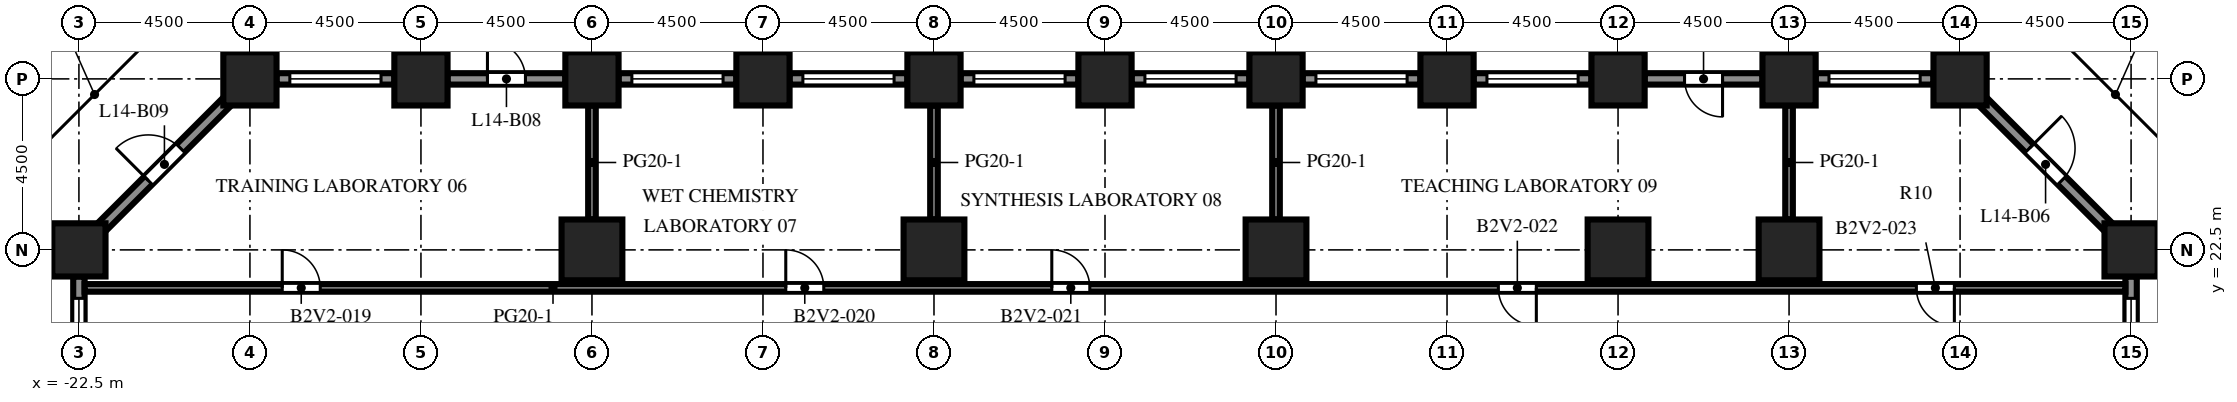
"""IFC4 building model, lengths in metres.
Left out: names, types, materials, properties, quantities, classifications, styles, units other than length and angle.
Written with IfcOpenShell. Run it as: python <this file> out.ifc"""

import sys

from ifc_helpers import new_model, si_unit, direction, frame, frame_2d, origin, origin_2d, place, context, subcontext, project, spatial, rectangle, extrude, element, fill, save


model = new_model("IFC4")
c1 = context("Model", 3, precision=1e-05, world=origin(), true_north=direction((0.0, 1.0)))
c2 = subcontext(c1, "Body", "Model", "MODEL_VIEW")
j1 = project(units=[si_unit("LENGTHUNIT", "METRE"), si_unit("PLANEANGLEUNIT", "RADIAN")], contexts=[c1])
p1 = place(None, origin())
s1 = spatial("IfcSite", under=j1, at=p1, CompositionType="ELEMENT")
p2 = place(p1, origin())
s2 = spatial("IfcBuilding", under=s1, at=p2, CompositionType="ELEMENT")
p3 = place(p2, frame((0.0, 0.0, 62.4)))
s3 = spatial("IfcBuildingStorey", under=s2, at=p3, CompositionType="ELEMENT", Elevation=62.4)
for number, where, z_axis, x_axis in (
    (1, (-22.5, 22.5, 0.0), (0.0, 0.0, 1.0), (1.0, 0.0, 0.0)),
    (2, (-18.0, 27.0, 0.0), (0.0, 0.0, 1.0), (1.0, 0.0, 0.0)),
    (3, (-13.5, 27.0, 0.0), (0.0, 0.0, 1.0), (1.0, 0.0, 0.0)),
    (4, (-9.0, 27.0, 0.0), (0.0, 0.0, 1.0), (1.0, 0.0, 0.0)),
    (5, (-4.5, 27.0, 0.0), (0.0, 0.0, 1.0), (1.0, 0.0, 0.0)),
    (6, (0.0, 27.0, 0.0), (0.0, 0.0, 1.0), (1.0, 0.0, 0.0)),
    (7, (4.5, 27.0, 0.0), (0.0, 0.0, 1.0), (1.0, 0.0, 0.0)),
    (8, (9.0, 27.0, 0.0), (0.0, 0.0, 1.0), (1.0, 0.0, 0.0)),
    (9, (13.5, 27.0, 0.0), (0.0, 0.0, 1.0), (1.0, 0.0, 0.0)),
    (10, (18.0, 27.0, 0.0), (0.0, 0.0, 1.0), (1.0, 0.0, 0.0)),
    (11, (22.5, 27.0, 0.0), (0.0, 0.0, 1.0), (1.0, 0.0, 0.0)),
    (12, (27.0, 27.0, 0.0), (0.0, 0.0, 1.0), (1.0, 0.0, 0.0)),
    (13, (31.5, 22.5, 0.0), (0.0, 0.0, 1.0), (1.0, 0.0, 0.0)),
):
    element("IfcColumn", number, at=place(p3, frame(where, z_axis=z_axis, x_axis=x_axis)), inside=s3, PredefinedType="COLUMN", context=c2, shape_type="SweptSolid", body=[
        extrude(rectangle(XDim=1.4, YDim=1.4, at=origin_2d()), origin(), (0.0, 0.0, 1.0), 4.1),
    ])
for number, where, z_axis, x_axis in (
    (14, (-9.0, 22.5, 0.0), (0.0, 0.0, 1.0), (1.0, 0.0, 0.0)),
    (15, (0.0, 22.5, 0.0), (0.0, 0.0, 1.0), (1.0, 0.0, 0.0)),
    (16, (9.0, 22.5, 0.0), (0.0, 0.0, 1.0), (1.0, 0.0, 0.0)),
    (17, (18.0, 22.5, 0.0), (0.0, 0.0, 1.0), (1.0, 0.0, 0.0)),
    (18, (22.5, 22.5, 0.0), (0.0, 0.0, 1.0), (1.0, 0.0, 0.0)),
):
    element("IfcColumn", number, at=place(p3, frame(where, z_axis=z_axis, x_axis=x_axis)), inside=s3, PredefinedType="COLUMN", context=c2, shape_type="SweptSolid", body=[
        extrude(rectangle(XDim=1.6, YDim=1.6, at=origin_2d()), origin(), (0.0, 0.0, 1.0), 4.1),
    ])
p4 = place(p3, frame((31.5, 21.8, 0.0), z_axis=(0.0, 0.0, 1.0), x_axis=(0.0, -1.0, 0.0)))
e19 = element("IfcWall", 19, at=p4, inside=s3, PredefinedType="SOLIDWALL", context=c2, shape_type="SweptSolid", body=[
    extrude(rectangle(XDim=3.1, YDim=0.3, at=frame_2d((1.55, 0.0))), origin(), (0.0, 0.0, 1.0), 2.75),
])
p5 = place(p4, frame((0.575, 0.0, 0.8)))
e20 = element("IfcOpeningElement", 20, at=p5, cuts=e19, PredefinedType="OPENING", context=c2, shape_type="SweptSolid", body=[
    extrude(rectangle(XDim=2.4, YDim=1.7, at=frame_2d((1.2, 0.85))), frame((0.0, 0.16, 0.0), z_axis=(0.0, -1.0, 0.0), x_axis=(1.0, 0.0, 0.0)), (0.0, 0.0, 1.0), 0.32),
])
p6 = place(p3, frame((27.594, 26.406, 0.0), z_axis=(0.0, 0.0, 1.0), x_axis=(0.707106781187, -0.707106781187, 0.0)))
e21 = element("IfcWall", 21, at=p6, inside=s3, PredefinedType="SOLIDWALL", context=c2, shape_type="SweptSolid", body=[
    extrude(rectangle(XDim=4.684, YDim=0.3, at=frame_2d((2.342, 0.0))), origin(), (0.0, 0.0, 1.0), 2.75),
])
p7 = place(p6, frame((1.742, 0.0, 0.0)))
e22 = element("IfcOpeningElement", 22, at=p7, cuts=e21, PredefinedType="OPENING", context=c2, shape_type="SweptSolid", body=[
    extrude(rectangle(XDim=1.2, YDim=2.2, at=frame_2d((0.6, 1.1))), frame((0.0, 0.16, 0.0), z_axis=(0.0, -1.0, 0.0), x_axis=(1.0, 0.0, 0.0)), (0.0, 0.0, 1.0), 0.32),
])
p8 = place(p3, frame((23.2, 27.0, 0.0), z_axis=(0.0, 0.0, 1.0), x_axis=(1.0, 0.0, 0.0)))
e23 = element("IfcWall", 23, at=p8, inside=s3, PredefinedType="SOLIDWALL", context=c2, shape_type="SweptSolid", body=[
    extrude(rectangle(XDim=3.1, YDim=0.3, at=frame_2d((1.55, 0.0))), origin(), (0.0, 0.0, 1.0), 2.75),
])
p9 = place(p8, frame((0.35, 0.0, 0.8)))
e24 = element("IfcOpeningElement", 24, at=p9, cuts=e23, PredefinedType="OPENING", context=c2, shape_type="SweptSolid", body=[
    extrude(rectangle(XDim=2.4, YDim=1.7, at=frame_2d((1.2, 0.85))), frame((0.0, 0.16, 0.0), z_axis=(0.0, -1.0, 0.0), x_axis=(1.0, 0.0, 0.0)), (0.0, 0.0, 1.0), 0.32),
])
p10 = place(p3, frame((18.7, 27.0, 0.0), z_axis=(0.0, 0.0, 1.0), x_axis=(1.0, 0.0, 0.0)))
e25 = element("IfcWall", 25, at=p10, inside=s3, PredefinedType="SOLIDWALL", context=c2, shape_type="SweptSolid", body=[
    extrude(rectangle(XDim=3.1, YDim=0.3, at=frame_2d((1.55, 0.0))), origin(), (0.0, 0.0, 1.0), 2.75),
])
p11 = place(p10, frame((1.05, 0.0, 0.0)))
e26 = element("IfcOpeningElement", 26, at=p11, cuts=e25, PredefinedType="OPENING", context=c2, shape_type="SweptSolid", body=[
    extrude(rectangle(XDim=1.0, YDim=2.2, at=frame_2d((0.5, 1.1))), frame((0.0, 0.16, 0.0), z_axis=(0.0, -1.0, 0.0), x_axis=(1.0, 0.0, 0.0)), (0.0, 0.0, 1.0), 0.32),
])
p12 = place(p3, frame((14.2, 27.0, 0.0), z_axis=(0.0, 0.0, 1.0), x_axis=(1.0, 0.0, 0.0)))
e27 = element("IfcWall", 27, at=p12, inside=s3, PredefinedType="SOLIDWALL", context=c2, shape_type="SweptSolid", body=[
    extrude(rectangle(XDim=3.1, YDim=0.3, at=frame_2d((1.55, 0.0))), origin(), (0.0, 0.0, 1.0), 2.75),
])
p13 = place(p12, frame((0.35, 0.0, 0.8)))
e28 = element("IfcOpeningElement", 28, at=p13, cuts=e27, PredefinedType="OPENING", context=c2, shape_type="SweptSolid", body=[
    extrude(rectangle(XDim=2.4, YDim=1.7, at=frame_2d((1.2, 0.85))), frame((0.0, 0.16, 0.0), z_axis=(0.0, -1.0, 0.0), x_axis=(1.0, 0.0, 0.0)), (0.0, 0.0, 1.0), 0.32),
])
p14 = place(p3, frame((9.7, 27.0, 0.0), z_axis=(0.0, 0.0, 1.0), x_axis=(1.0, 0.0, 0.0)))
e29 = element("IfcWall", 29, at=p14, inside=s3, PredefinedType="SOLIDWALL", context=c2, shape_type="SweptSolid", body=[
    extrude(rectangle(XDim=3.1, YDim=0.3, at=frame_2d((1.55, 0.0))), origin(), (0.0, 0.0, 1.0), 2.75),
])
p15 = place(p14, frame((0.35, 0.0, 0.8)))
e30 = element("IfcOpeningElement", 30, at=p15, cuts=e29, PredefinedType="OPENING", context=c2, shape_type="SweptSolid", body=[
    extrude(rectangle(XDim=2.4, YDim=1.7, at=frame_2d((1.2, 0.85))), frame((0.0, 0.16, 0.0), z_axis=(0.0, -1.0, 0.0), x_axis=(1.0, 0.0, 0.0)), (0.0, 0.0, 1.0), 0.32),
])
p16 = place(p3, frame((5.2, 27.0, 0.0), z_axis=(0.0, 0.0, 1.0), x_axis=(1.0, 0.0, 0.0)))
e31 = element("IfcWall", 31, at=p16, inside=s3, PredefinedType="SOLIDWALL", context=c2, shape_type="SweptSolid", body=[
    extrude(rectangle(XDim=3.1, YDim=0.3, at=frame_2d((1.55, 0.0))), origin(), (0.0, 0.0, 1.0), 2.75),
])
p17 = place(p16, frame((0.35, 0.0, 0.8)))
e32 = element("IfcOpeningElement", 32, at=p17, cuts=e31, PredefinedType="OPENING", context=c2, shape_type="SweptSolid", body=[
    extrude(rectangle(XDim=2.4, YDim=1.7, at=frame_2d((1.2, 0.85))), frame((0.0, 0.16, 0.0), z_axis=(0.0, -1.0, 0.0), x_axis=(1.0, 0.0, 0.0)), (0.0, 0.0, 1.0), 0.32),
])
p18 = place(p3, frame((0.7, 27.0, 0.0), z_axis=(0.0, 0.0, 1.0), x_axis=(1.0, 0.0, 0.0)))
e33 = element("IfcWall", 33, at=p18, inside=s3, PredefinedType="SOLIDWALL", context=c2, shape_type="SweptSolid", body=[
    extrude(rectangle(XDim=3.1, YDim=0.3, at=frame_2d((1.55, 0.0))), origin(), (0.0, 0.0, 1.0), 2.75),
])
p19 = place(p18, frame((0.35, 0.0, 0.8)))
e34 = element("IfcOpeningElement", 34, at=p19, cuts=e33, PredefinedType="OPENING", context=c2, shape_type="SweptSolid", body=[
    extrude(rectangle(XDim=2.4, YDim=1.7, at=frame_2d((1.2, 0.85))), frame((0.0, 0.16, 0.0), z_axis=(0.0, -1.0, 0.0), x_axis=(1.0, 0.0, 0.0)), (0.0, 0.0, 1.0), 0.32),
])
p20 = place(p3, frame((-3.8, 27.0, 0.0), z_axis=(0.0, 0.0, 1.0), x_axis=(1.0, 0.0, 0.0)))
e35 = element("IfcWall", 35, at=p20, inside=s3, PredefinedType="SOLIDWALL", context=c2, shape_type="SweptSolid", body=[
    extrude(rectangle(XDim=3.1, YDim=0.3, at=frame_2d((1.55, 0.0))), origin(), (0.0, 0.0, 1.0), 2.75),
])
p21 = place(p20, frame((0.35, 0.0, 0.8)))
e36 = element("IfcOpeningElement", 36, at=p21, cuts=e35, PredefinedType="OPENING", context=c2, shape_type="SweptSolid", body=[
    extrude(rectangle(XDim=2.4, YDim=1.7, at=frame_2d((1.2, 0.85))), frame((0.0, 0.16, 0.0), z_axis=(0.0, -1.0, 0.0), x_axis=(1.0, 0.0, 0.0)), (0.0, 0.0, 1.0), 0.32),
])
p22 = place(p3, frame((-8.3, 27.0, 0.0), z_axis=(0.0, 0.0, 1.0), x_axis=(1.0, 0.0, 0.0)))
e37 = element("IfcWall", 37, at=p22, inside=s3, PredefinedType="SOLIDWALL", context=c2, shape_type="SweptSolid", body=[
    extrude(rectangle(XDim=3.1, YDim=0.3, at=frame_2d((1.55, 0.0))), origin(), (0.0, 0.0, 1.0), 2.75),
])
p23 = place(p22, frame((0.35, 0.0, 0.8)))
e38 = element("IfcOpeningElement", 38, at=p23, cuts=e37, PredefinedType="OPENING", context=c2, shape_type="SweptSolid", body=[
    extrude(rectangle(XDim=2.4, YDim=1.7, at=frame_2d((1.2, 0.85))), frame((0.0, 0.16, 0.0), z_axis=(0.0, -1.0, 0.0), x_axis=(1.0, 0.0, 0.0)), (0.0, 0.0, 1.0), 0.32),
])
p24 = place(p3, frame((-12.8, 27.0, 0.0), z_axis=(0.0, 0.0, 1.0), x_axis=(1.0, 0.0, 0.0)))
e39 = element("IfcWall", 39, at=p24, inside=s3, PredefinedType="SOLIDWALL", context=c2, shape_type="SweptSolid", body=[
    extrude(rectangle(XDim=3.1, YDim=0.3, at=frame_2d((1.55, 0.0))), origin(), (0.0, 0.0, 1.0), 2.75),
])
p25 = place(p24, frame((1.05, 0.0, 0.0)))
e40 = element("IfcOpeningElement", 40, at=p25, cuts=e39, PredefinedType="OPENING", context=c2, shape_type="SweptSolid", body=[
    extrude(rectangle(XDim=1.0, YDim=2.2, at=frame_2d((0.5, 1.1))), frame((0.0, 0.16, 0.0), z_axis=(0.0, -1.0, 0.0), x_axis=(1.0, 0.0, 0.0)), (0.0, 0.0, 1.0), 0.32),
])
p26 = place(p3, frame((-17.3, 27.0, 0.0), z_axis=(0.0, 0.0, 1.0), x_axis=(1.0, 0.0, 0.0)))
e41 = element("IfcWall", 41, at=p26, inside=s3, PredefinedType="SOLIDWALL", context=c2, shape_type="SweptSolid", body=[
    extrude(rectangle(XDim=3.1, YDim=0.3, at=frame_2d((1.55, 0.0))), origin(), (0.0, 0.0, 1.0), 2.75),
])
p27 = place(p26, frame((0.35, 0.0, 0.8)))
e42 = element("IfcOpeningElement", 42, at=p27, cuts=e41, PredefinedType="OPENING", context=c2, shape_type="SweptSolid", body=[
    extrude(rectangle(XDim=2.4, YDim=1.7, at=frame_2d((1.2, 0.85))), frame((0.0, 0.16, 0.0), z_axis=(0.0, -1.0, 0.0), x_axis=(1.0, 0.0, 0.0)), (0.0, 0.0, 1.0), 0.32),
])
p28 = place(p3, frame((-21.906, 23.094, 0.0), z_axis=(0.0, 0.0, 1.0), x_axis=(0.707106781187, 0.707106781187, 0.0)))
e43 = element("IfcWall", 43, at=p28, inside=s3, PredefinedType="SOLIDWALL", context=c2, shape_type="SweptSolid", body=[
    extrude(rectangle(XDim=4.684, YDim=0.3, at=frame_2d((2.342, 0.0))), origin(), (0.0, 0.0, 1.0), 2.75),
])
p29 = place(p28, frame((1.742, 0.0, 0.0)))
e44 = element("IfcOpeningElement", 44, at=p29, cuts=e43, PredefinedType="OPENING", context=c2, shape_type="SweptSolid", body=[
    extrude(rectangle(XDim=1.2, YDim=2.2, at=frame_2d((0.6, 1.1))), frame((0.0, 0.16, 0.0), z_axis=(0.0, -1.0, 0.0), x_axis=(1.0, 0.0, 0.0)), (0.0, 0.0, 1.0), 0.32),
])
p30 = place(p3, frame((-22.5, 18.7, 0.0), z_axis=(0.0, 0.0, 1.0), x_axis=(0.0, 1.0, 0.0)))
e45 = element("IfcWall", 45, at=p30, inside=s3, PredefinedType="SOLIDWALL", context=c2, shape_type="SweptSolid", body=[
    extrude(rectangle(XDim=3.1, YDim=0.3, at=frame_2d((1.55, 0.0))), origin(), (0.0, 0.0, 1.0), 2.75),
])
p31 = place(p30, frame((0.125, 0.0, 0.8)))
e46 = element("IfcOpeningElement", 46, at=p31, cuts=e45, PredefinedType="OPENING", context=c2, shape_type="SweptSolid", body=[
    extrude(rectangle(XDim=2.4, YDim=1.7, at=frame_2d((1.2, 0.85))), frame((0.0, 0.16, 0.0), z_axis=(0.0, -1.0, 0.0), x_axis=(1.0, 0.0, 0.0)), (0.0, 0.0, 1.0), 0.32),
])
for number, where, z_axis, x_axis in (
    (47, (-9.0, 23.3, 0.0), (0.0, 0.0, 1.0), (0.0, 1.0, 0.0)),
    (48, (0.0, 23.3, 0.0), (0.0, 0.0, 1.0), (0.0, 1.0, 0.0)),
    (49, (9.0, 23.3, 0.0), (0.0, 0.0, 1.0), (0.0, 1.0, 0.0)),
    (50, (22.5, 23.3, 0.0), (0.0, 0.0, 1.0), (0.0, 1.0, 0.0)),
):
    element("IfcWall", number, at=place(p3, frame(where, z_axis=z_axis, x_axis=x_axis)), inside=s3, PredefinedType="PARTITIONING", context=c2, shape_type="SweptSolid", body=[
        extrude(rectangle(XDim=3.0, YDim=0.2, at=frame_2d((1.5, 0.0))), origin(), (0.0, 0.0, 1.0), 3.65),
    ])
p32 = place(p3, frame((-22.35, 21.5, 0.0), z_axis=(0.0, 0.0, 1.0), x_axis=(1.0, 0.0, 0.0)))
e51 = element("IfcWall", 51, at=p32, inside=s3, PredefinedType="PARTITIONING", context=c2, shape_type="SweptSolid", body=[
    extrude(rectangle(XDim=53.7, YDim=0.2, at=frame_2d((26.85, 0.0))), origin(), (0.0, 0.0, 1.0), 3.65),
])
p33 = place(p32, frame((5.2, 0.0, 0.0)))
e52 = element("IfcOpeningElement", 52, at=p33, cuts=e51, PredefinedType="OPENING", context=c2, shape_type="SweptSolid", body=[
    extrude(rectangle(XDim=1.0, YDim=2.1, at=frame_2d((0.5, 1.05))), frame((0.0, 0.11, 0.0), z_axis=(0.0, -1.0, 0.0), x_axis=(1.0, 0.0, 0.0)), (0.0, 0.0, 1.0), 0.22),
])
p34 = place(p32, frame((18.45, 0.0, 0.0)))
e53 = element("IfcOpeningElement", 53, at=p34, cuts=e51, PredefinedType="OPENING", context=c2, shape_type="SweptSolid", body=[
    extrude(rectangle(XDim=1.0, YDim=2.1, at=frame_2d((0.5, 1.05))), frame((0.0, 0.11, 0.0), z_axis=(0.0, -1.0, 0.0), x_axis=(1.0, 0.0, 0.0)), (0.0, 0.0, 1.0), 0.22),
])
p35 = place(p32, frame((25.45, 0.0, 0.0)))
e54 = element("IfcOpeningElement", 54, at=p35, cuts=e51, PredefinedType="OPENING", context=c2, shape_type="SweptSolid", body=[
    extrude(rectangle(XDim=1.0, YDim=2.1, at=frame_2d((0.5, 1.05))), frame((0.0, 0.11, 0.0), z_axis=(0.0, -1.0, 0.0), x_axis=(1.0, 0.0, 0.0)), (0.0, 0.0, 1.0), 0.22),
])
p36 = place(p32, frame((37.2, 0.0, 0.0)))
e55 = element("IfcOpeningElement", 55, at=p36, cuts=e51, PredefinedType="OPENING", context=c2, shape_type="SweptSolid", body=[
    extrude(rectangle(XDim=1.0, YDim=2.1, at=frame_2d((0.5, 1.05))), frame((0.0, 0.11, 0.0), z_axis=(0.0, -1.0, 0.0), x_axis=(1.0, 0.0, 0.0)), (0.0, 0.0, 1.0), 0.22),
])
p37 = place(p32, frame((48.2, 0.0, 0.0)))
e56 = element("IfcOpeningElement", 56, at=p37, cuts=e51, PredefinedType="OPENING", context=c2, shape_type="SweptSolid", body=[
    extrude(rectangle(XDim=1.0, YDim=2.1, at=frame_2d((0.5, 1.05))), frame((0.0, 0.11, 0.0), z_axis=(0.0, -1.0, 0.0), x_axis=(1.0, 0.0, 0.0)), (0.0, 0.0, 1.0), 0.22),
])
p38 = place(p5, origin())
e57 = element("IfcWindow", 57, at=p38, inside=s3, PartitioningType="SINGLE_PANEL", PredefinedType="WINDOW", context=c2, shape_type="SweptSolid", body=[
    extrude(rectangle(XDim=2.4, YDim=1.7, at=frame_2d((1.2, 0.85))), frame((0.0, 0.03, 0.0), z_axis=(0.0, -1.0, 0.0), x_axis=(1.0, 0.0, 0.0)), (0.0, 0.0, 1.0), 0.06),
])
fill(e20, e57)
p39 = place(p7, origin())
e58 = element("IfcDoor", 58, at=p39, inside=s3, OperationType="SINGLE_SWING_LEFT", PredefinedType="DOOR", context=c2, shape_type="SweptSolid", body=[
    extrude(rectangle(XDim=1.2, YDim=2.2, at=frame_2d((0.6, 1.1))), frame((0.0, 0.025, 0.0), z_axis=(0.0, -1.0, 0.0), x_axis=(1.0, 0.0, 0.0)), (0.0, 0.0, 1.0), 0.05),
])
fill(e22, e58)
p40 = place(p9, origin())
e59 = element("IfcWindow", 59, at=p40, inside=s3, PartitioningType="SINGLE_PANEL", PredefinedType="WINDOW", context=c2, shape_type="SweptSolid", body=[
    extrude(rectangle(XDim=2.4, YDim=1.7, at=frame_2d((1.2, 0.85))), frame((0.0, 0.03, 0.0), z_axis=(0.0, -1.0, 0.0), x_axis=(1.0, 0.0, 0.0)), (0.0, 0.0, 1.0), 0.06),
])
fill(e24, e59)
p41 = place(p11, origin())
e60 = element("IfcDoor", 60, at=p41, inside=s3, OperationType="SINGLE_SWING_RIGHT", PredefinedType="DOOR", context=c2, shape_type="SweptSolid", body=[
    extrude(rectangle(XDim=1.0, YDim=2.2, at=frame_2d((0.5, 1.1))), frame((0.0, 0.025, 0.0), z_axis=(0.0, -1.0, 0.0), x_axis=(1.0, 0.0, 0.0)), (0.0, 0.0, 1.0), 0.05),
])
fill(e26, e60)
p42 = place(p13, origin())
e61 = element("IfcWindow", 61, at=p42, inside=s3, PartitioningType="SINGLE_PANEL", PredefinedType="WINDOW", context=c2, shape_type="SweptSolid", body=[
    extrude(rectangle(XDim=2.4, YDim=1.7, at=frame_2d((1.2, 0.85))), frame((0.0, 0.03, 0.0), z_axis=(0.0, -1.0, 0.0), x_axis=(1.0, 0.0, 0.0)), (0.0, 0.0, 1.0), 0.06),
])
fill(e28, e61)
p43 = place(p15, origin())
e62 = element("IfcWindow", 62, at=p43, inside=s3, PartitioningType="SINGLE_PANEL", PredefinedType="WINDOW", context=c2, shape_type="SweptSolid", body=[
    extrude(rectangle(XDim=2.4, YDim=1.7, at=frame_2d((1.2, 0.85))), frame((0.0, 0.03, 0.0), z_axis=(0.0, -1.0, 0.0), x_axis=(1.0, 0.0, 0.0)), (0.0, 0.0, 1.0), 0.06),
])
fill(e30, e62)
p44 = place(p17, origin())
e63 = element("IfcWindow", 63, at=p44, inside=s3, PartitioningType="SINGLE_PANEL", PredefinedType="WINDOW", context=c2, shape_type="SweptSolid", body=[
    extrude(rectangle(XDim=2.4, YDim=1.7, at=frame_2d((1.2, 0.85))), frame((0.0, 0.03, 0.0), z_axis=(0.0, -1.0, 0.0), x_axis=(1.0, 0.0, 0.0)), (0.0, 0.0, 1.0), 0.06),
])
fill(e32, e63)
p45 = place(p19, origin())
e64 = element("IfcWindow", 64, at=p45, inside=s3, PartitioningType="SINGLE_PANEL", PredefinedType="WINDOW", context=c2, shape_type="SweptSolid", body=[
    extrude(rectangle(XDim=2.4, YDim=1.7, at=frame_2d((1.2, 0.85))), frame((0.0, 0.03, 0.0), z_axis=(0.0, -1.0, 0.0), x_axis=(1.0, 0.0, 0.0)), (0.0, 0.0, 1.0), 0.06),
])
fill(e34, e64)
p46 = place(p21, origin())
e65 = element("IfcWindow", 65, at=p46, inside=s3, PartitioningType="SINGLE_PANEL", PredefinedType="WINDOW", context=c2, shape_type="SweptSolid", body=[
    extrude(rectangle(XDim=2.4, YDim=1.7, at=frame_2d((1.2, 0.85))), frame((0.0, 0.03, 0.0), z_axis=(0.0, -1.0, 0.0), x_axis=(1.0, 0.0, 0.0)), (0.0, 0.0, 1.0), 0.06),
])
fill(e36, e65)
p47 = place(p23, origin())
e66 = element("IfcWindow", 66, at=p47, inside=s3, PartitioningType="SINGLE_PANEL", PredefinedType="WINDOW", context=c2, shape_type="SweptSolid", body=[
    extrude(rectangle(XDim=2.4, YDim=1.7, at=frame_2d((1.2, 0.85))), frame((0.0, 0.03, 0.0), z_axis=(0.0, -1.0, 0.0), x_axis=(1.0, 0.0, 0.0)), (0.0, 0.0, 1.0), 0.06),
])
fill(e38, e66)
p48 = place(p25, origin())
e67 = element("IfcDoor", 67, at=p48, inside=s3, OperationType="SINGLE_SWING_LEFT", PredefinedType="DOOR", context=c2, shape_type="SweptSolid", body=[
    extrude(rectangle(XDim=1.0, YDim=2.2, at=frame_2d((0.5, 1.1))), frame((0.0, 0.025, 0.0), z_axis=(0.0, -1.0, 0.0), x_axis=(1.0, 0.0, 0.0)), (0.0, 0.0, 1.0), 0.05),
])
fill(e40, e67)
p49 = place(p27, origin())
e68 = element("IfcWindow", 68, at=p49, inside=s3, PartitioningType="SINGLE_PANEL", PredefinedType="WINDOW", context=c2, shape_type="SweptSolid", body=[
    extrude(rectangle(XDim=2.4, YDim=1.7, at=frame_2d((1.2, 0.85))), frame((0.0, 0.03, 0.0), z_axis=(0.0, -1.0, 0.0), x_axis=(1.0, 0.0, 0.0)), (0.0, 0.0, 1.0), 0.06),
])
fill(e42, e68)
p50 = place(p29, origin())
e69 = element("IfcDoor", 69, at=p50, inside=s3, OperationType="SINGLE_SWING_LEFT", PredefinedType="DOOR", context=c2, shape_type="SweptSolid", body=[
    extrude(rectangle(XDim=1.2, YDim=2.2, at=frame_2d((0.6, 1.1))), frame((0.0, 0.025, 0.0), z_axis=(0.0, -1.0, 0.0), x_axis=(1.0, 0.0, 0.0)), (0.0, 0.0, 1.0), 0.05),
])
fill(e44, e69)
p51 = place(p31, origin())
e70 = element("IfcWindow", 70, at=p51, inside=s3, PartitioningType="SINGLE_PANEL", PredefinedType="WINDOW", context=c2, shape_type="SweptSolid", body=[
    extrude(rectangle(XDim=2.4, YDim=1.7, at=frame_2d((1.2, 0.85))), frame((0.0, 0.03, 0.0), z_axis=(0.0, -1.0, 0.0), x_axis=(1.0, 0.0, 0.0)), (0.0, 0.0, 1.0), 0.06),
])
fill(e46, e70)
p52 = place(p33, origin())
e71 = element("IfcDoor", 71, at=p52, inside=s3, OperationType="SINGLE_SWING_LEFT", PredefinedType="DOOR", context=c2, shape_type="SweptSolid", body=[
    extrude(rectangle(XDim=1.0, YDim=2.1, at=frame_2d((0.5, 1.05))), frame((0.0, 0.025, 0.0), z_axis=(0.0, -1.0, 0.0), x_axis=(1.0, 0.0, 0.0)), (0.0, 0.0, 1.0), 0.05),
])
fill(e52, e71)
p53 = place(p34, origin())
e72 = element("IfcDoor", 72, at=p53, inside=s3, OperationType="SINGLE_SWING_LEFT", PredefinedType="DOOR", context=c2, shape_type="SweptSolid", body=[
    extrude(rectangle(XDim=1.0, YDim=2.1, at=frame_2d((0.5, 1.05))), frame((0.0, 0.025, 0.0), z_axis=(0.0, -1.0, 0.0), x_axis=(1.0, 0.0, 0.0)), (0.0, 0.0, 1.0), 0.05),
])
fill(e53, e72)
p54 = place(p35, origin())
e73 = element("IfcDoor", 73, at=p54, inside=s3, OperationType="SINGLE_SWING_LEFT", PredefinedType="DOOR", context=c2, shape_type="SweptSolid", body=[
    extrude(rectangle(XDim=1.0, YDim=2.1, at=frame_2d((0.5, 1.05))), frame((0.0, 0.025, 0.0), z_axis=(0.0, -1.0, 0.0), x_axis=(1.0, 0.0, 0.0)), (0.0, 0.0, 1.0), 0.05),
])
fill(e54, e73)
p55 = place(p36, origin())
e74 = element("IfcDoor", 74, at=p55, inside=s3, OperationType="SINGLE_SWING_RIGHT", PredefinedType="DOOR", context=c2, shape_type="SweptSolid", body=[
    extrude(rectangle(XDim=1.0, YDim=2.1, at=frame_2d((0.5, 1.05))), frame((0.0, 0.025, 0.0), z_axis=(0.0, -1.0, 0.0), x_axis=(1.0, 0.0, 0.0)), (0.0, 0.0, 1.0), 0.05),
])
fill(e55, e74)
p56 = place(p37, origin())
e75 = element("IfcDoor", 75, at=p56, inside=s3, OperationType="SINGLE_SWING_RIGHT", PredefinedType="DOOR", context=c2, shape_type="SweptSolid", body=[
    extrude(rectangle(XDim=1.0, YDim=2.1, at=frame_2d((0.5, 1.05))), frame((0.0, 0.025, 0.0), z_axis=(0.0, -1.0, 0.0), x_axis=(1.0, 0.0, 0.0)), (0.0, 0.0, 1.0), 0.05),
])
fill(e56, e75)
save(model, sys.argv[1])
